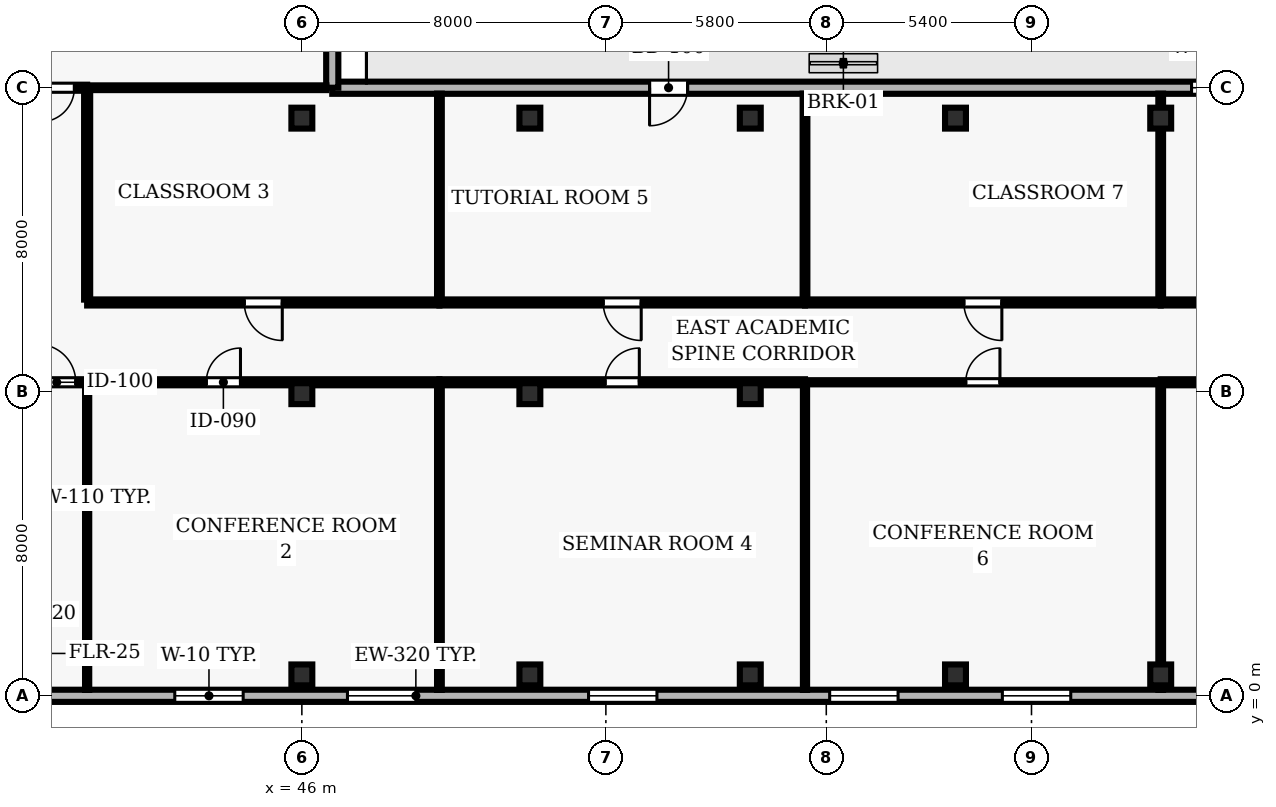
"""IFC4 building model, lengths in metres.
Left out: names, types, materials, properties, quantities, classifications, styles, units other than length and angle.
Written with IfcOpenShell. Run it as: python <this file> out.ifc"""

import sys

from ifc_helpers import new_model, si_unit, direction, frame, frame_2d, origin, origin_2d, place, context, subcontext, project, spatial, rectangle, hollow_rectangle, extrude, element, fill, save


model = new_model("IFC4")
c1 = context("Model", 3, precision=1e-05, world=origin(), true_north=direction((0.0, 1.0)))
c2 = subcontext(c1, "Body", "Model", "MODEL_VIEW")
j1 = project(units=[si_unit("LENGTHUNIT", "METRE"), si_unit("PLANEANGLEUNIT", "RADIAN")], contexts=[c1])
p1 = place(None, origin())
s1 = spatial("IfcSite", under=j1, at=p1, CompositionType="ELEMENT")
p2 = place(p1, origin())
s2 = spatial("IfcBuilding", under=s1, at=p2, CompositionType="ELEMENT")
p3 = place(p2, frame((0.0, 0.0, 89.5)))
s3 = spatial("IfcBuildingStorey", under=s2, at=p3, CompositionType="ELEMENT", Elevation=89.5)
for number, where, z_axis, x_axis in (
    (1, (46.0, 0.55, 0.0), (0.0, 0.0, 1.0), (1.0, 0.0, 0.0)),
    (2, (46.0, 7.95, 0.0), (0.0, 0.0, 1.0), (1.0, 0.0, 0.0)),
    (3, (46.0, 15.2, 0.0), (0.0, 0.0, 1.0), (1.0, 0.0, 0.0)),
    (4, (52.0, 0.55, 0.0), (0.0, 0.0, 1.0), (1.0, 0.0, 0.0)),
    (5, (52.0, 7.95, 0.0), (0.0, 0.0, 1.0), (1.0, 0.0, 0.0)),
    (6, (52.0, 15.2, 0.0), (0.0, 0.0, 1.0), (1.0, 0.0, 0.0)),
    (7, (57.8, 0.55, 0.0), (0.0, 0.0, 1.0), (1.0, 0.0, 0.0)),
    (8, (57.8, 7.95, 0.0), (0.0, 0.0, 1.0), (1.0, 0.0, 0.0)),
    (9, (57.8, 15.2, 0.0), (0.0, 0.0, 1.0), (1.0, 0.0, 0.0)),
    (10, (63.2, 0.55, 0.0), (0.0, 0.0, 1.0), (1.0, 0.0, 0.0)),
    (11, (63.2, 15.2, 0.0), (0.0, 0.0, 1.0), (1.0, 0.0, 0.0)),
    (12, (68.6, 0.55, 0.0), (0.0, 0.0, 1.0), (1.0, 0.0, 0.0)),
    (13, (68.6, 15.2, 0.0), (0.0, 0.0, 1.0), (1.0, 0.0, 0.0)),
):
    element("IfcColumn", number, at=place(p3, frame(where, z_axis=z_axis, x_axis=x_axis)), inside=s3, PredefinedType="COLUMN", context=c2, shape_type="SweptSolid", body=[
        extrude(hollow_rectangle(XDim=0.55, YDim=0.55, WallThickness=0.025, at=origin_2d()), origin(), (0.0, 0.0, 1.0), 3.9),
    ])
p4 = place(p3, frame((24.5, 0.0, 0.0), z_axis=(0.0, 0.0, 1.0), x_axis=(1.0, 0.0, 0.0)))
e14 = element("IfcWall", 14, at=p4, inside=s3, PredefinedType="SOLIDWALL", context=c2, shape_type="SweptSolid", body=[
    extrude(rectangle(XDim=49.0, YDim=0.32, at=frame_2d((24.5, 0.0))), origin(), (0.0, 0.0, 1.0), 3.64),
])
p5 = place(p4, frame((1.822, 0.0, 0.9)))
e15 = element("IfcOpeningElement", 15, at=p5, cuts=e14, PredefinedType="OPENING", context=c2, shape_type="SweptSolid", body=[
    extrude(rectangle(XDim=1.8, YDim=2.2, at=frame_2d((0.9, 1.1))), frame((0.0, 0.17, 0.0), z_axis=(0.0, -1.0, 0.0), x_axis=(1.0, 0.0, 0.0)), (0.0, 0.0, 1.0), 0.34),
])
p6 = place(p4, frame((18.156, 0.0, 0.9)))
e16 = element("IfcOpeningElement", 16, at=p6, cuts=e14, PredefinedType="OPENING", context=c2, shape_type="SweptSolid", body=[
    extrude(rectangle(XDim=1.8, YDim=2.2, at=frame_2d((0.9, 1.1))), frame((0.0, 0.17, 0.0), z_axis=(0.0, -1.0, 0.0), x_axis=(1.0, 0.0, 0.0)), (0.0, 0.0, 1.0), 0.34),
])
p7 = place(p4, frame((22.7, 0.0, 0.9)))
e17 = element("IfcOpeningElement", 17, at=p7, cuts=e14, PredefinedType="OPENING", context=c2, shape_type="SweptSolid", body=[
    extrude(rectangle(XDim=1.8, YDim=2.2, at=frame_2d((0.9, 1.1))), frame((0.0, 0.17, 0.0), z_axis=(0.0, -1.0, 0.0), x_axis=(1.0, 0.0, 0.0)), (0.0, 0.0, 1.0), 0.34),
])
p8 = place(p4, frame((29.044, 0.0, 0.9)))
e18 = element("IfcOpeningElement", 18, at=p8, cuts=e14, PredefinedType="OPENING", context=c2, shape_type="SweptSolid", body=[
    extrude(rectangle(XDim=1.8, YDim=2.2, at=frame_2d((0.9, 1.1))), frame((0.0, 0.17, 0.0), z_axis=(0.0, -1.0, 0.0), x_axis=(1.0, 0.0, 0.0)), (0.0, 0.0, 1.0), 0.34),
])
p9 = place(p4, frame((35.389, 0.0, 0.9)))
e19 = element("IfcOpeningElement", 19, at=p9, cuts=e14, PredefinedType="OPENING", context=c2, shape_type="SweptSolid", body=[
    extrude(rectangle(XDim=1.8, YDim=2.2, at=frame_2d((0.9, 1.1))), frame((0.0, 0.17, 0.0), z_axis=(0.0, -1.0, 0.0), x_axis=(1.0, 0.0, 0.0)), (0.0, 0.0, 1.0), 0.34),
])
p10 = place(p4, frame((39.933, 0.0, 0.9)))
e20 = element("IfcOpeningElement", 20, at=p10, cuts=e14, PredefinedType="OPENING", context=c2, shape_type="SweptSolid", body=[
    extrude(rectangle(XDim=1.8, YDim=2.2, at=frame_2d((0.9, 1.1))), frame((0.0, 0.17, 0.0), z_axis=(0.0, -1.0, 0.0), x_axis=(1.0, 0.0, 0.0)), (0.0, 0.0, 1.0), 0.34),
])
p11 = place(p4, frame((45.378, 0.0, 0.9)))
e21 = element("IfcOpeningElement", 21, at=p11, cuts=e14, PredefinedType="OPENING", context=c2, shape_type="SweptSolid", body=[
    extrude(rectangle(XDim=1.8, YDim=2.2, at=frame_2d((0.9, 1.1))), frame((0.0, 0.17, 0.0), z_axis=(0.0, -1.0, 0.0), x_axis=(1.0, 0.0, 0.0)), (0.0, 0.0, 1.0), 0.34),
])
p12 = place(p3, frame((73.5, 16.0, 0.0), z_axis=(0.0, 0.0, 1.0), x_axis=(-1.0, 0.0, 0.0)))
e22 = element("IfcWall", 22, at=p12, inside=s3, PredefinedType="SOLIDWALL", context=c2, shape_type="SweptSolid", body=[
    extrude(rectangle(XDim=26.7, YDim=0.32, at=frame_2d((13.35, 0.0))), origin(), (0.0, 0.0, 1.0), 3.64),
])
p13 = place(p12, frame((17.35, 0.0, 0.0)))
e23 = element("IfcOpeningElement", 23, at=p13, cuts=e22, PredefinedType="OPENING", context=c2, shape_type="SweptSolid", body=[
    extrude(rectangle(XDim=1.0, YDim=2.2, at=frame_2d((0.5, 1.1))), frame((0.0, 0.17, 0.0), z_axis=(0.0, -1.0, 0.0), x_axis=(1.0, 0.0, 0.0)), (0.0, 0.0, 1.0), 0.34),
])
p14 = place(p12, frame((2.588, 0.0, 0.9)))
e24 = element("IfcOpeningElement", 24, at=p14, cuts=e22, PredefinedType="OPENING", context=c2, shape_type="SweptSolid", body=[
    extrude(rectangle(XDim=1.5, YDim=1.6, at=frame_2d((0.75, 0.8))), frame((0.0, 0.17, 0.0), z_axis=(0.0, -1.0, 0.0), x_axis=(1.0, 0.0, 0.0)), (0.0, 0.0, 1.0), 0.34),
])
p15 = place(p3, frame((46.8, 16.0, 0.0), z_axis=(0.0, 0.0, 1.0), x_axis=(0.0, 1.0, 0.0)))
e25 = element("IfcWall", 25, at=p15, inside=s3, PredefinedType="SOLIDWALL", context=c2, shape_type="SweptSolid", body=[
    extrude(rectangle(XDim=7.485, YDim=0.32, at=frame_2d((3.743, 0.0))), origin(), (0.0, 0.0, 1.0), 3.64),
])
p16 = place(p15, frame((2.842, 0.0, 0.9)))
e26 = element("IfcOpeningElement", 26, at=p16, cuts=e25, PredefinedType="OPENING", context=c2, shape_type="SweptSolid", body=[
    extrude(rectangle(XDim=1.8, YDim=1.6, at=frame_2d((0.9, 0.8))), frame((0.0, 0.17, 0.0), z_axis=(0.0, -1.0, 0.0), x_axis=(1.0, 0.0, 0.0)), (0.0, 0.0, 1.0), 0.34),
])
p17 = place(p3, frame((38.05, 8.25, 0.0), z_axis=(0.0, 0.0, 1.0), x_axis=(1.0, 0.0, 0.0)))
e27 = element("IfcWall", 27, at=p17, inside=s3, PredefinedType="PARTITIONING", context=c2, shape_type="SweptSolid", body=[
    extrude(rectangle(XDim=2.3, YDim=0.16, at=frame_2d((1.15, 0.0))), origin(), (0.0, 0.0, 1.0), 3.005),
])
p18 = place(p17, frame((1.0, 0.0, 0.0)))
e28 = element("IfcOpeningElement", 28, at=p18, cuts=e27, PredefinedType="OPENING", context=c2, shape_type="SweptSolid", body=[
    extrude(rectangle(XDim=1.0, YDim=2.1, at=frame_2d((0.5, 1.05))), frame((0.0, 0.09, 0.0), z_axis=(0.0, -1.0, 0.0), x_axis=(1.0, 0.0, 0.0)), (0.0, 0.0, 1.0), 0.18),
])
p19 = place(p3, frame((40.35, 8.25, 0.0), z_axis=(0.0, 0.0, 1.0), x_axis=(1.0, 0.0, 0.0)))
e29 = element("IfcWall", 29, at=p19, inside=s3, PredefinedType="PARTITIONING", context=c2, shape_type="SweptSolid", body=[
    extrude(rectangle(XDim=9.27, YDim=0.16, at=frame_2d((4.635, 0.0))), origin(), (0.0, 0.0, 1.0), 3.005),
])
p20 = place(p19, frame((3.135, 0.0, 0.0)))
e30 = element("IfcOpeningElement", 30, at=p20, cuts=e29, PredefinedType="OPENING", context=c2, shape_type="SweptSolid", body=[
    extrude(rectangle(XDim=0.9, YDim=2.1, at=frame_2d((0.45, 1.05))), frame((0.0, 0.09, 0.0), z_axis=(0.0, -1.0, 0.0), x_axis=(1.0, 0.0, 0.0)), (0.0, 0.0, 1.0), 0.18),
])
p21 = place(p3, frame((40.35, 16.0, 0.0), z_axis=(0.0, 0.0, 1.0), x_axis=(1.0, 0.0, 0.0)))
e31 = element("IfcWall", 31, at=p21, inside=s3, PredefinedType="PARTITIONING", context=c2, shape_type="SweptSolid", body=[
    extrude(rectangle(XDim=6.295, YDim=0.125, at=frame_2d((3.147, 0.0))), origin(), (0.0, 0.0, 1.0), 3.64),
])
p22 = place(p3, frame((40.35, 16.0, 0.0), z_axis=(0.0, 0.0, 1.0), x_axis=(-1.0, 0.0, 0.0)))
e32 = element("IfcWall", 32, at=p22, inside=s3, PredefinedType="PARTITIONING", context=c2, shape_type="SweptSolid", body=[
    extrude(rectangle(XDim=2.27, YDim=0.16, at=frame_2d((1.135, 0.0))), origin(), (0.0, 0.0, 1.0), 3.64),
])
p23 = place(p22, frame((0.335, 0.0, 0.0)))
e33 = element("IfcOpeningElement", 33, at=p23, cuts=e32, PredefinedType="OPENING", context=c2, shape_type="SweptSolid", body=[
    extrude(rectangle(XDim=0.9, YDim=2.1, at=frame_2d((0.45, 1.05))), frame((0.0, 0.09, 0.0), z_axis=(0.0, -1.0, 0.0), x_axis=(1.0, 0.0, 0.0)), (0.0, 0.0, 1.0), 0.18),
])
p24 = place(p3, frame((49.62, 8.25, 0.0), z_axis=(0.0, 0.0, 1.0), x_axis=(1.0, 0.0, 0.0)))
e34 = element("IfcWall", 34, at=p24, inside=s3, PredefinedType="PARTITIONING", context=c2, shape_type="SweptSolid", body=[
    extrude(rectangle(XDim=9.62, YDim=0.16, at=frame_2d((4.81, 0.0))), origin(), (0.0, 0.0, 1.0), 3.005),
])
p25 = place(p24, frame((4.36, 0.0, 0.0)))
e35 = element("IfcOpeningElement", 35, at=p25, cuts=e34, PredefinedType="OPENING", context=c2, shape_type="SweptSolid", body=[
    extrude(rectangle(XDim=0.9, YDim=2.1, at=frame_2d((0.45, 1.05))), frame((0.0, 0.09, 0.0), z_axis=(0.0, -1.0, 0.0), x_axis=(1.0, 0.0, 0.0)), (0.0, 0.0, 1.0), 0.18),
])
p26 = place(p3, frame((49.62, 10.35, 0.0), z_axis=(0.0, 0.0, 1.0), x_axis=(-1.0, 0.0, 0.0)))
e36 = element("IfcWall", 36, at=p26, inside=s3, PredefinedType="PARTITIONING", context=c2, shape_type="SweptSolid", body=[
    extrude(rectangle(XDim=9.27, YDim=0.16, at=frame_2d((4.635, 0.0))), origin(), (0.0, 0.0, 1.0), 3.227),
])
p27 = place(p26, frame((4.135, 0.0, 0.0)))
e37 = element("IfcOpeningElement", 37, at=p27, cuts=e36, PredefinedType="OPENING", context=c2, shape_type="SweptSolid", body=[
    extrude(rectangle(XDim=1.0, YDim=2.1, at=frame_2d((0.5, 1.05))), frame((0.0, 0.09, 0.0), z_axis=(0.0, -1.0, 0.0), x_axis=(1.0, 0.0, 0.0)), (0.0, 0.0, 1.0), 0.18),
])
p28 = place(p3, frame((59.24, 8.25, 0.0), z_axis=(0.0, 0.0, 1.0), x_axis=(1.0, 0.0, 0.0)))
e38 = element("IfcWall", 38, at=p28, inside=s3, PredefinedType="MOVABLE", context=c2, shape_type="SweptSolid", body=[
    extrude(rectangle(XDim=9.36, YDim=0.11, at=frame_2d((4.68, 0.0))), origin(), (0.0, 0.0, 1.0), 3.64),
])
p29 = place(p28, frame((4.23, 0.0, 0.0)))
e39 = element("IfcOpeningElement", 39, at=p29, cuts=e38, PredefinedType="OPENING", context=c2, shape_type="SweptSolid", body=[
    extrude(rectangle(XDim=0.9, YDim=2.1, at=frame_2d((0.45, 1.05))), frame((0.0, 0.065, 0.0), z_axis=(0.0, -1.0, 0.0), x_axis=(1.0, 0.0, 0.0)), (0.0, 0.0, 1.0), 0.13),
])
p30 = place(p3, frame((59.24, 10.35, 0.0), z_axis=(0.0, 0.0, 1.0), x_axis=(-1.0, 0.0, 0.0)))
e40 = element("IfcWall", 40, at=p30, inside=s3, PredefinedType="PARTITIONING", context=c2, shape_type="SweptSolid", body=[
    extrude(rectangle(XDim=9.62, YDim=0.16, at=frame_2d((4.81, 0.0))), origin(), (0.0, 0.0, 1.0), 3.227),
])
p31 = place(p30, frame((4.31, 0.0, 0.0)))
e41 = element("IfcOpeningElement", 41, at=p31, cuts=e40, PredefinedType="OPENING", context=c2, shape_type="SweptSolid", body=[
    extrude(rectangle(XDim=1.0, YDim=2.1, at=frame_2d((0.5, 1.05))), frame((0.0, 0.09, 0.0), z_axis=(0.0, -1.0, 0.0), x_axis=(1.0, 0.0, 0.0)), (0.0, 0.0, 1.0), 0.18),
])
p32 = place(p3, frame((68.6, 8.25, 0.0), z_axis=(0.0, 0.0, 1.0), x_axis=(1.0, 0.0, 0.0)))
e42 = element("IfcWall", 42, at=p32, inside=s3, PredefinedType="PARTITIONING", context=c2, shape_type="SweptSolid", body=[
    extrude(rectangle(XDim=7.245, YDim=0.16, at=frame_2d((3.623, 0.0))), origin(), (0.0, 0.0, 1.0), 3.64),
])
p33 = place(p32, frame((3.173, 0.0, 0.0)))
e43 = element("IfcOpeningElement", 43, at=p33, cuts=e42, PredefinedType="OPENING", context=c2, shape_type="SweptSolid", body=[
    extrude(rectangle(XDim=0.9, YDim=2.1, at=frame_2d((0.45, 1.05))), frame((0.0, 0.09, 0.0), z_axis=(0.0, -1.0, 0.0), x_axis=(1.0, 0.0, 0.0)), (0.0, 0.0, 1.0), 0.18),
])
p34 = place(p3, frame((68.6, 10.35, 0.0), z_axis=(0.0, 0.0, 1.0), x_axis=(-1.0, 0.0, 0.0)))
e44 = element("IfcWall", 44, at=p34, inside=s3, PredefinedType="PARTITIONING", context=c2, shape_type="SweptSolid", body=[
    extrude(rectangle(XDim=9.36, YDim=0.16, at=frame_2d((4.68, 0.0))), origin(), (0.0, 0.0, 1.0), 3.227),
])
p35 = place(p34, frame((4.18, 0.0, 0.0)))
e45 = element("IfcOpeningElement", 45, at=p35, cuts=e44, PredefinedType="OPENING", context=c2, shape_type="SweptSolid", body=[
    extrude(rectangle(XDim=1.0, YDim=2.1, at=frame_2d((0.5, 1.05))), frame((0.0, 0.09, 0.0), z_axis=(0.0, -1.0, 0.0), x_axis=(1.0, 0.0, 0.0)), (0.0, 0.0, 1.0), 0.18),
])
p36 = place(p3, frame((75.845, 10.35, 0.0), z_axis=(0.0, 0.0, 1.0), x_axis=(-1.0, 0.0, 0.0)))
e46 = element("IfcWall", 46, at=p36, inside=s3, PredefinedType="PARTITIONING", context=c2, shape_type="SweptSolid", body=[
    extrude(rectangle(XDim=7.245, YDim=0.16, at=frame_2d((3.623, 0.0))), origin(), (0.0, 0.0, 1.0), 3.64),
])
p37 = place(p36, frame((3.123, 0.0, 0.0)))
e47 = element("IfcOpeningElement", 47, at=p37, cuts=e46, PredefinedType="OPENING", context=c2, shape_type="SweptSolid", body=[
    extrude(rectangle(XDim=1.0, YDim=2.1, at=frame_2d((0.5, 1.05))), frame((0.0, 0.09, 0.0), z_axis=(0.0, -1.0, 0.0), x_axis=(1.0, 0.0, 0.0)), (0.0, 0.0, 1.0), 0.18),
])
p38 = place(p3, frame((40.35, 0.155, 0.0), z_axis=(0.0, 0.0, 1.0), x_axis=(0.0, 1.0, 0.0)))
e48 = element("IfcWall", 48, at=p38, inside=s3, PredefinedType="MOVABLE", context=c2, shape_type="SweptSolid", body=[
    extrude(rectangle(XDim=8.02, YDim=0.11, at=frame_2d((4.01, 0.0))), origin(), (0.0, 0.0, 1.0), 3.64),
])
p39 = place(p3, frame((40.35, 10.425, 0.0), z_axis=(0.0, 0.0, 1.0), x_axis=(0.0, 1.0, 0.0)))
e49 = element("IfcWall", 49, at=p39, inside=s3, PredefinedType="PARTITIONING", context=c2, shape_type="SweptSolid", body=[
    extrude(rectangle(XDim=5.5, YDim=0.16, at=frame_2d((2.75, 0.0))), origin(), (0.0, 0.0, 1.0), 3.227),
])
p40 = place(p3, frame((49.62, 0.155, 0.0), z_axis=(0.0, 0.0, 1.0), x_axis=(0.0, 1.0, 0.0)))
e50 = element("IfcWall", 50, at=p40, inside=s3, PredefinedType="PARTITIONING", context=c2, shape_type="SweptSolid", body=[
    extrude(rectangle(XDim=8.02, YDim=0.125, at=frame_2d((4.01, 0.0))), origin(), (0.0, 0.0, 1.0), 3.64),
])
p41 = place(p3, frame((49.62, 10.425, 0.0), z_axis=(0.0, 0.0, 1.0), x_axis=(0.0, 1.0, 0.0)))
e51 = element("IfcWall", 51, at=p41, inside=s3, PredefinedType="PARTITIONING", context=c2, shape_type="SweptSolid", body=[
    extrude(rectangle(XDim=5.42, YDim=0.125, at=frame_2d((2.71, 0.0))), origin(), (0.0, 0.0, 1.0), 3.64),
])
p42 = place(p3, frame((59.24, 0.155, 0.0), z_axis=(0.0, 0.0, 1.0), x_axis=(0.0, 1.0, 0.0)))
e52 = element("IfcWall", 52, at=p42, inside=s3, PredefinedType="MOVABLE", context=c2, shape_type="SweptSolid", body=[
    extrude(rectangle(XDim=8.02, YDim=0.11, at=frame_2d((4.01, 0.0))), origin(), (0.0, 0.0, 1.0), 3.64),
])
p43 = place(p3, frame((59.24, 10.425, 0.0), z_axis=(0.0, 0.0, 1.0), x_axis=(0.0, 1.0, 0.0)))
e53 = element("IfcWall", 53, at=p43, inside=s3, PredefinedType="PARTITIONING", context=c2, shape_type="SweptSolid", body=[
    extrude(rectangle(XDim=5.42, YDim=0.125, at=frame_2d((2.71, 0.0))), origin(), (0.0, 0.0, 1.0), 3.64),
])
p44 = place(p3, frame((68.6, 0.155, 0.0), z_axis=(0.0, 0.0, 1.0), x_axis=(0.0, 1.0, 0.0)))
e54 = element("IfcWall", 54, at=p44, inside=s3, PredefinedType="PARTITIONING", context=c2, shape_type="SweptSolid", body=[
    extrude(rectangle(XDim=8.02, YDim=0.125, at=frame_2d((4.01, 0.0))), origin(), (0.0, 0.0, 1.0), 3.005),
])
p45 = place(p3, frame((68.6, 10.425, 0.0), z_axis=(0.0, 0.0, 1.0), x_axis=(0.0, 1.0, 0.0)))
e55 = element("IfcWall", 55, at=p45, inside=s3, PredefinedType="PARTITIONING", context=c2, shape_type="SweptSolid", body=[
    extrude(rectangle(XDim=5.42, YDim=0.125, at=frame_2d((2.71, 0.0))), origin(), (0.0, 0.0, 1.0), 3.005),
])
p46 = place(p6, origin())
e56 = element("IfcWindow", 56, at=p46, inside=s3, PartitioningType="SINGLE_PANEL", PredefinedType="WINDOW", context=c2, shape_type="SweptSolid", body=[
    extrude(rectangle(XDim=1.8, YDim=2.2, at=frame_2d((0.9, 1.1))), frame((0.0, 0.03, 0.0), z_axis=(0.0, -1.0, 0.0), x_axis=(1.0, 0.0, 0.0)), (0.0, 0.0, 1.0), 0.06),
])
fill(e16, e56)
p47 = place(p7, origin())
e57 = element("IfcWindow", 57, at=p47, inside=s3, PartitioningType="SINGLE_PANEL", PredefinedType="WINDOW", context=c2, shape_type="SweptSolid", body=[
    extrude(rectangle(XDim=1.8, YDim=2.2, at=frame_2d((0.9, 1.1))), frame((0.0, 0.03, 0.0), z_axis=(0.0, -1.0, 0.0), x_axis=(1.0, 0.0, 0.0)), (0.0, 0.0, 1.0), 0.06),
])
fill(e17, e57)
p48 = place(p8, origin())
e58 = element("IfcWindow", 58, at=p48, inside=s3, PartitioningType="SINGLE_PANEL", PredefinedType="WINDOW", context=c2, shape_type="SweptSolid", body=[
    extrude(rectangle(XDim=1.8, YDim=2.2, at=frame_2d((0.9, 1.1))), frame((0.0, 0.03, 0.0), z_axis=(0.0, -1.0, 0.0), x_axis=(1.0, 0.0, 0.0)), (0.0, 0.0, 1.0), 0.06),
])
fill(e18, e58)
p49 = place(p9, origin())
e59 = element("IfcWindow", 59, at=p49, inside=s3, PartitioningType="SINGLE_PANEL", PredefinedType="WINDOW", context=c2, shape_type="SweptSolid", body=[
    extrude(rectangle(XDim=1.8, YDim=2.2, at=frame_2d((0.9, 1.1))), frame((0.0, 0.03, 0.0), z_axis=(0.0, -1.0, 0.0), x_axis=(1.0, 0.0, 0.0)), (0.0, 0.0, 1.0), 0.06),
])
fill(e19, e59)
p50 = place(p10, origin())
e60 = element("IfcWindow", 60, at=p50, inside=s3, PartitioningType="SINGLE_PANEL", PredefinedType="WINDOW", context=c2, shape_type="SweptSolid", body=[
    extrude(rectangle(XDim=1.8, YDim=2.2, at=frame_2d((0.9, 1.1))), frame((0.0, 0.03, 0.0), z_axis=(0.0, -1.0, 0.0), x_axis=(1.0, 0.0, 0.0)), (0.0, 0.0, 1.0), 0.06),
])
fill(e20, e60)
p51 = place(p13, origin())
e61 = element("IfcDoor", 61, at=p51, inside=s3, OperationType="SINGLE_SWING_RIGHT", PredefinedType="DOOR", context=c2, shape_type="SweptSolid", body=[
    extrude(rectangle(XDim=1.0, YDim=2.2, at=frame_2d((0.5, 1.1))), frame((0.0, 0.025, 0.0), z_axis=(0.0, -1.0, 0.0), x_axis=(1.0, 0.0, 0.0)), (0.0, 0.0, 1.0), 0.05),
])
fill(e23, e61)
p52 = place(p14, origin())
e62 = element("IfcWindow", 62, at=p52, inside=s3, PartitioningType="SINGLE_PANEL", PredefinedType="WINDOW", context=c2, shape_type="SweptSolid", body=[
    extrude(rectangle(XDim=1.5, YDim=1.6, at=frame_2d((0.75, 0.8))), frame((0.0, 0.03, 0.0), z_axis=(0.0, -1.0, 0.0), x_axis=(1.0, 0.0, 0.0)), (0.0, 0.0, 1.0), 0.06),
])
fill(e24, e62)
p53 = place(p18, origin())
e63 = element("IfcDoor", 63, at=p53, inside=s3, OperationType="SINGLE_SWING_LEFT", PredefinedType="DOOR", context=c2, shape_type="SweptSolid", body=[
    extrude(rectangle(XDim=1.0, YDim=2.1, at=frame_2d((0.5, 1.05))), frame((0.0, 0.025, 0.0), z_axis=(0.0, -1.0, 0.0), x_axis=(1.0, 0.0, 0.0)), (0.0, 0.0, 1.0), 0.05),
])
fill(e28, e63)
p54 = place(p20, origin())
e64 = element("IfcDoor", 64, at=p54, inside=s3, OperationType="SINGLE_SWING_RIGHT", PredefinedType="DOOR", context=c2, shape_type="SweptSolid", body=[
    extrude(rectangle(XDim=0.9, YDim=2.1, at=frame_2d((0.45, 1.05))), frame((0.0, 0.025, 0.0), z_axis=(0.0, -1.0, 0.0), x_axis=(1.0, 0.0, 0.0)), (0.0, 0.0, 1.0), 0.05),
])
fill(e30, e64)
p55 = place(p27, origin())
e65 = element("IfcDoor", 65, at=p55, inside=s3, OperationType="SINGLE_SWING_LEFT", PredefinedType="DOOR", context=c2, shape_type="SweptSolid", body=[
    extrude(rectangle(XDim=1.0, YDim=2.1, at=frame_2d((0.5, 1.05))), frame((0.0, 0.025, 0.0), z_axis=(0.0, -1.0, 0.0), x_axis=(1.0, 0.0, 0.0)), (0.0, 0.0, 1.0), 0.05),
])
fill(e37, e65)
p56 = place(p25, origin())
e66 = element("IfcDoor", 66, at=p56, inside=s3, OperationType="SINGLE_SWING_RIGHT", PredefinedType="DOOR", context=c2, shape_type="SweptSolid", body=[
    extrude(rectangle(XDim=0.9, YDim=2.1, at=frame_2d((0.45, 1.05))), frame((0.0, 0.025, 0.0), z_axis=(0.0, -1.0, 0.0), x_axis=(1.0, 0.0, 0.0)), (0.0, 0.0, 1.0), 0.05),
])
fill(e35, e66)
p57 = place(p31, origin())
e67 = element("IfcDoor", 67, at=p57, inside=s3, OperationType="SINGLE_SWING_LEFT", PredefinedType="DOOR", context=c2, shape_type="SweptSolid", body=[
    extrude(rectangle(XDim=1.0, YDim=2.1, at=frame_2d((0.5, 1.05))), frame((0.0, 0.025, 0.0), z_axis=(0.0, -1.0, 0.0), x_axis=(1.0, 0.0, 0.0)), (0.0, 0.0, 1.0), 0.05),
])
fill(e41, e67)
p58 = place(p29, origin())
e68 = element("IfcDoor", 68, at=p58, inside=s3, OperationType="SINGLE_SWING_RIGHT", PredefinedType="DOOR", context=c2, shape_type="SweptSolid", body=[
    extrude(rectangle(XDim=0.9, YDim=2.1, at=frame_2d((0.45, 1.05))), frame((0.0, 0.025, 0.0), z_axis=(0.0, -1.0, 0.0), x_axis=(1.0, 0.0, 0.0)), (0.0, 0.0, 1.0), 0.05),
])
fill(e39, e68)
p59 = place(p35, origin())
e69 = element("IfcDoor", 69, at=p59, inside=s3, OperationType="SINGLE_SWING_LEFT", PredefinedType="DOOR", context=c2, shape_type="SweptSolid", body=[
    extrude(rectangle(XDim=1.0, YDim=2.1, at=frame_2d((0.5, 1.05))), frame((0.0, 0.025, 0.0), z_axis=(0.0, -1.0, 0.0), x_axis=(1.0, 0.0, 0.0)), (0.0, 0.0, 1.0), 0.05),
])
fill(e45, e69)
p60 = place(p23, origin())
e70 = element("IfcDoor", 70, at=p60, inside=s3, OperationType="SINGLE_SWING_RIGHT", PredefinedType="DOOR", context=c2, shape_type="SweptSolid", body=[
    extrude(rectangle(XDim=0.9, YDim=2.1, at=frame_2d((0.45, 1.05))), frame((0.0, 0.025, 0.0), z_axis=(0.0, -1.0, 0.0), x_axis=(1.0, 0.0, 0.0)), (0.0, 0.0, 1.0), 0.05),
])
fill(e33, e70)
save(model, sys.argv[1])
